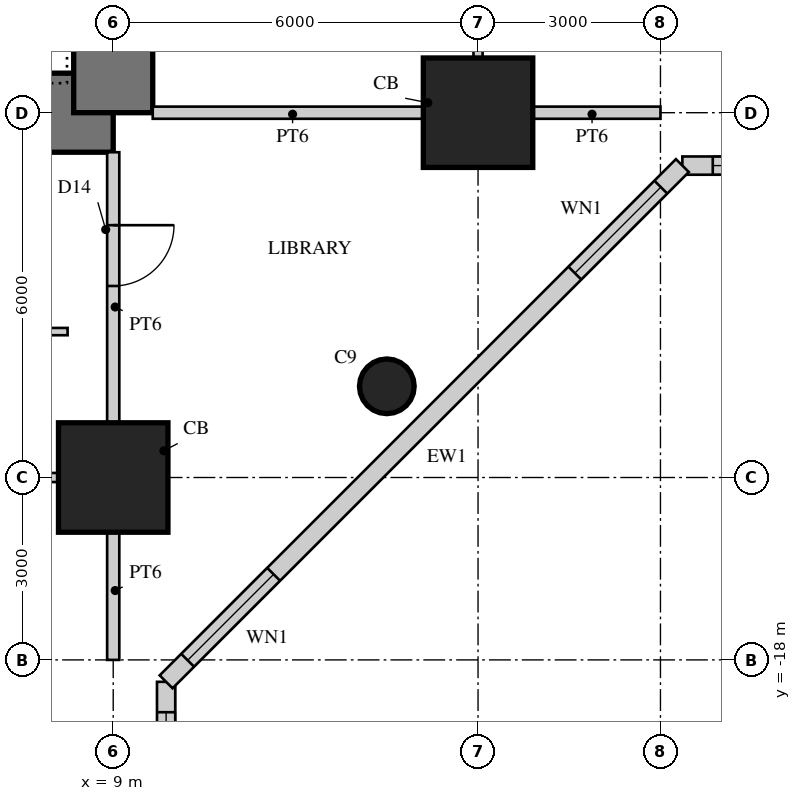
"""IFC4 building model, lengths in metres.
Left out: names, types, materials, properties, quantities, classifications, styles, units other than length and angle.
Written with IfcOpenShell. Run it as: python <this file> out.ifc"""

import sys

from ifc_helpers import new_model, si_unit, direction, frame, frame_2d, origin, origin_2d, place, context, subcontext, project, spatial, rectangle, hollow_rectangle, circle, extrude, element, fill, save


model = new_model("IFC4")
c1 = context("Model", 3, precision=1e-05, world=origin(), true_north=direction((0.0, 1.0)))
c2 = subcontext(c1, "Body", "Model", "MODEL_VIEW")
j1 = project(units=[si_unit("LENGTHUNIT", "METRE"), si_unit("PLANEANGLEUNIT", "RADIAN")], contexts=[c1])
p1 = place(None, origin())
s1 = spatial("IfcSite", under=j1, at=p1, CompositionType="ELEMENT")
p2 = place(p1, origin())
s2 = spatial("IfcBuilding", under=s1, at=p2, CompositionType="ELEMENT")
p3 = place(p2, frame((0.0, 0.0, 9.5)))
s3 = spatial("IfcBuildingStorey", under=s2, at=p3, CompositionType="ELEMENT", Elevation=9.5)
p4 = place(p3, frame((-9.0, -9.0, 0.0), z_axis=(0.0, 0.0, 1.0), x_axis=(1.0, 0.0, 0.0)))
e1 = element("IfcWall", 1, at=p4, inside=s3, PredefinedType="SHEAR", context=c2, shape_type="SweptSolid", body=[
    extrude(rectangle(XDim=18.0, YDim=1.3, at=frame_2d((9.0, 0.0))), origin(), (0.0, 0.0, 1.0), 4.5),
])
p5 = place(p4, frame((9.8, 0.0, 0.0)))
e2 = element("IfcOpeningElement", 2, at=p5, cuts=e1, PredefinedType="OPENING", context=c2, shape_type="SweptSolid", body=[
    extrude(rectangle(XDim=1.0, YDim=2.4, at=frame_2d((0.5, 1.2))), frame((0.0, 0.66, 0.0), z_axis=(0.0, -1.0, 0.0), x_axis=(1.0, 0.0, 0.0)), (0.0, 0.0, 1.0), 1.32),
])
p6 = place(p3, frame((9.0, -9.0, 0.0), z_axis=(0.0, 0.0, 1.0), x_axis=(0.0, 1.0, 0.0)))
e3 = element("IfcWall", 3, at=p6, inside=s3, PredefinedType="SHEAR", context=c2, shape_type="SweptSolid", body=[
    extrude(rectangle(XDim=18.0, YDim=1.3, at=frame_2d((9.0, 0.0))), origin(), (0.0, 0.0, 1.0), 4.5),
])
p7 = place(p6, frame((9.8, 0.0, 0.0)))
e4 = element("IfcOpeningElement", 4, at=p7, cuts=e3, PredefinedType="OPENING", context=c2, shape_type="SweptSolid", body=[
    extrude(rectangle(XDim=1.0, YDim=2.4, at=frame_2d((0.5, 1.2))), frame((0.0, 0.66, 0.0), z_axis=(0.0, -1.0, 0.0), x_axis=(1.0, 0.0, 0.0)), (0.0, 0.0, 1.0), 1.32),
])
for number, where, z_axis, x_axis in (
    (5, (15.0, -9.0, 0.0), (0.0, 0.0, 1.0), (1.0, 0.0, 0.0)),
    (6, (9.0, -15.0, 0.0), (0.0, 0.0, 1.0), (1.0, 0.0, 0.0)),
):
    element("IfcColumn", number, at=place(p3, frame(where, z_axis=z_axis, x_axis=x_axis)), inside=s3, PredefinedType="COLUMN", context=c2, shape_type="SweptSolid", body=[
        extrude(rectangle(XDim=1.8, YDim=1.8, at=origin_2d()), origin(), (0.0, 0.0, 1.0), 4.5),
    ])
p8 = place(p3, frame((13.5, -13.5, 0.0), z_axis=(0.0, 0.0, 1.0), x_axis=(1.0, 0.0, 0.0)))
e7 = element("IfcColumn", 7, at=p8, inside=s3, PredefinedType="COLUMN", context=c2, shape_type="SweptSolid", body=[
    extrude(circle(Radius=0.45, at=origin_2d()), origin(), (0.0, 0.0, 1.0), 4.5),
])
p9 = place(p3, frame((18.36, -9.87, 0.0), z_axis=(0.0, 0.0, 1.0), x_axis=(1.0, 0.0, 0.0)))
e8 = element("IfcWall", 8, at=p9, inside=s3, PredefinedType="SOLIDWALL", context=c2, shape_type="SweptSolid", body=[
    extrude(rectangle(XDim=6.0, YDim=0.3, at=frame_2d((3.0, 0.0))), origin(), (0.0, 0.0, 1.0), 4.3),
])
p10 = place(p9, frame((0.5, 0.0, 0.9)))
e9 = element("IfcOpeningElement", 9, at=p10, cuts=e8, PredefinedType="OPENING", context=c2, shape_type="SweptSolid", body=[
    extrude(rectangle(XDim=2.0, YDim=1.8, at=frame_2d((1.0, 0.9))), frame((0.0, 0.16, 0.0), z_axis=(0.0, -1.0, 0.0), x_axis=(1.0, 0.0, 0.0)), (0.0, 0.0, 1.0), 0.32),
])
p11 = place(p3, frame((9.87, -24.36, 0.0), z_axis=(0.0, 0.0, 1.0), x_axis=(0.0, 1.0, 0.0)))
e10 = element("IfcWall", 10, at=p11, inside=s3, PredefinedType="SOLIDWALL", context=c2, shape_type="SweptSolid", body=[
    extrude(rectangle(XDim=6.0, YDim=0.3, at=frame_2d((3.0, 0.0))), origin(), (0.0, 0.0, 1.0), 4.3),
])
p12 = place(p11, frame((3.5, 0.0, 0.9)))
e11 = element("IfcOpeningElement", 11, at=p12, cuts=e10, PredefinedType="OPENING", context=c2, shape_type="SweptSolid", body=[
    extrude(rectangle(XDim=2.0, YDim=1.8, at=frame_2d((1.0, 0.9))), frame((0.0, 0.16, 0.0), z_axis=(0.0, -1.0, 0.0), x_axis=(1.0, 0.0, 0.0)), (0.0, 0.0, 1.0), 0.32),
])
p13 = place(p3, frame((9.87, -18.36, 0.0), z_axis=(0.0, 0.0, 1.0), x_axis=(0.707106781187, 0.707106781187, 0.0)))
e12 = element("IfcWall", 12, at=p13, inside=s3, PredefinedType="SOLIDWALL", context=c2, shape_type="SweptSolid", body=[
    extrude(rectangle(XDim=12.007, YDim=0.3, at=frame_2d((6.003, 0.0))), origin(), (0.0, 0.0, 1.0), 4.3),
])
p14 = place(p13, frame((0.501, 0.0, 0.9)))
e13 = element("IfcOpeningElement", 13, at=p14, cuts=e12, PredefinedType="OPENING", context=c2, shape_type="SweptSolid", body=[
    extrude(rectangle(XDim=2.0, YDim=1.8, at=frame_2d((1.0, 0.9))), frame((0.0, 0.16, 0.0), z_axis=(0.0, -1.0, 0.0), x_axis=(1.0, 0.0, 0.0)), (0.0, 0.0, 1.0), 0.32),
])
p15 = place(p13, frame((9.506, 0.0, 0.9)))
e14 = element("IfcOpeningElement", 14, at=p15, cuts=e12, PredefinedType="OPENING", context=c2, shape_type="SweptSolid", body=[
    extrude(rectangle(XDim=2.0, YDim=1.8, at=frame_2d((1.0, 0.9))), frame((0.0, 0.16, 0.0), z_axis=(0.0, -1.0, 0.0), x_axis=(1.0, 0.0, 0.0)), (0.0, 0.0, 1.0), 0.32),
])
p16 = place(p3, frame((15.0, -8.25, 0.0), z_axis=(0.0, 0.0, 1.0), x_axis=(0.0, 1.0, 0.0)))
e15 = element("IfcWall", 15, at=p16, inside=s3, PredefinedType="PARTITIONING", context=c2, shape_type="SweptSolid", body=[
    extrude(rectangle(XDim=7.45, YDim=0.15, at=frame_2d((3.725, 0.0))), origin(), (0.0, 0.0, 1.0), 3.35),
])
p17 = place(p3, frame((2.575, -15.0, 0.0), z_axis=(0.0, 0.0, 1.0), x_axis=(1.0, 0.0, 0.0)))
e16 = element("IfcWall", 16, at=p17, inside=s3, PredefinedType="PARTITIONING", context=c2, shape_type="SweptSolid", body=[
    extrude(rectangle(XDim=5.675, YDim=0.15, at=frame_2d((2.837, 0.0))), origin(), (0.0, 0.0, 1.0), 3.35),
])
p18 = place(p3, frame((2.575, -12.6, 0.0), z_axis=(0.0, 0.0, 1.0), x_axis=(1.0, 0.0, 0.0)))
e17 = element("IfcWall", 17, at=p18, inside=s3, PredefinedType="PLUMBINGWALL", context=c2, shape_type="SweptSolid", body=[
    extrude(rectangle(XDim=5.675, YDim=0.12, at=frame_2d((2.837, 0.0))), origin(), (0.0, 0.0, 1.0), 4.3),
])
p19 = place(p3, frame((9.0, -9.65, 0.0), z_axis=(0.0, 0.0, 1.0), x_axis=(0.0, -1.0, 0.0)))
e18 = element("IfcWall", 18, at=p19, inside=s3, PredefinedType="SOLIDWALL", context=c2, shape_type="SweptSolid", body=[
    extrude(rectangle(XDim=4.6, YDim=0.2, at=frame_2d((2.3, 0.0))), origin(), (0.0, 0.0, 1.0), 3.3),
])
p20 = place(p19, frame((1.2, 0.0, 0.0)))
e19 = element("IfcOpeningElement", 19, at=p20, cuts=e18, PredefinedType="OPENING", context=c2, shape_type="SweptSolid", body=[
    extrude(rectangle(XDim=1.0, YDim=2.2, at=frame_2d((0.5, 1.1))), frame((0.0, 0.11, 0.0), z_axis=(0.0, -1.0, 0.0), x_axis=(1.0, 0.0, 0.0)), (0.0, 0.0, 1.0), 0.22),
])
p21 = place(p3, frame((9.0, -15.75, 0.0), z_axis=(0.0, 0.0, 1.0), x_axis=(0.0, -1.0, 0.0)))
e20 = element("IfcWall", 20, at=p21, inside=s3, PredefinedType="SOLIDWALL", context=c2, shape_type="SweptSolid", body=[
    extrude(rectangle(XDim=2.25, YDim=0.2, at=frame_2d((1.125, 0.0))), origin(), (0.0, 0.0, 1.0), 3.3),
])
p22 = place(p3, frame((14.25, -9.0, 0.0), z_axis=(0.0, 0.0, 1.0), x_axis=(-1.0, 0.0, 0.0)))
e21 = element("IfcWall", 21, at=p22, inside=s3, PredefinedType="SOLIDWALL", context=c2, shape_type="SweptSolid", body=[
    extrude(rectangle(XDim=4.6, YDim=0.2, at=frame_2d((2.3, 0.0))), origin(), (0.0, 0.0, 1.0), 3.3),
])
p23 = place(p3, frame((18.0, -9.0, 0.0), z_axis=(0.0, 0.0, 1.0), x_axis=(-1.0, 0.0, 0.0)))
e22 = element("IfcWall", 22, at=p23, inside=s3, PredefinedType="SOLIDWALL", context=c2, shape_type="SweptSolid", body=[
    extrude(rectangle(XDim=2.25, YDim=0.2, at=frame_2d((1.125, 0.0))), origin(), (0.0, 0.0, 1.0), 3.3),
])
p24 = place(p10, origin())
e23 = element("IfcWindow", 23, at=p24, inside=s3, PartitioningType="SINGLE_PANEL", PredefinedType="WINDOW", context=c2, shape_type="SweptSolid", body=[
    extrude(hollow_rectangle(XDim=2.0, YDim=1.8, WallThickness=0.06, at=frame_2d((1.0, 0.9))), frame((0.0, 0.03, 0.0), z_axis=(0.0, -1.0, 0.0), x_axis=(1.0, 0.0, 0.0)), (0.0, 0.0, 1.0), 0.06),
    extrude(rectangle(XDim=1.879, YDim=1.679, at=frame_2d((1.0, 0.9))), frame((0.0, 0.03, 0.0), z_axis=(0.0, -1.0, 0.0), x_axis=(1.0, 0.0, 0.0)), (0.0, 0.0, 1.0), 0.06),
])
fill(e9, e23)
p25 = place(p12, origin())
e24 = element("IfcWindow", 24, at=p25, inside=s3, PartitioningType="SINGLE_PANEL", PredefinedType="WINDOW", context=c2, shape_type="SweptSolid", body=[
    extrude(hollow_rectangle(XDim=2.0, YDim=1.8, WallThickness=0.06, at=frame_2d((1.0, 0.9))), frame((0.0, 0.03, 0.0), z_axis=(0.0, -1.0, 0.0), x_axis=(1.0, 0.0, 0.0)), (0.0, 0.0, 1.0), 0.06),
    extrude(rectangle(XDim=1.879, YDim=1.679, at=frame_2d((1.0, 0.9))), frame((0.0, 0.03, 0.0), z_axis=(0.0, -1.0, 0.0), x_axis=(1.0, 0.0, 0.0)), (0.0, 0.0, 1.0), 0.06),
])
fill(e11, e24)
p26 = place(p14, origin())
e25 = element("IfcWindow", 25, at=p26, inside=s3, PartitioningType="SINGLE_PANEL", PredefinedType="WINDOW", context=c2, shape_type="SweptSolid", body=[
    extrude(hollow_rectangle(XDim=2.0, YDim=1.8, WallThickness=0.06, at=frame_2d((1.0, 0.9))), frame((0.0, 0.03, 0.0), z_axis=(0.0, -1.0, 0.0), x_axis=(1.0, 0.0, 0.0)), (0.0, 0.0, 1.0), 0.06),
    extrude(rectangle(XDim=1.879, YDim=1.679, at=frame_2d((1.0, 0.9))), frame((0.0, 0.03, 0.0), z_axis=(0.0, -1.0, 0.0), x_axis=(1.0, 0.0, 0.0)), (0.0, 0.0, 1.0), 0.06),
])
fill(e13, e25)
p27 = place(p15, origin())
e26 = element("IfcWindow", 26, at=p27, inside=s3, PartitioningType="SINGLE_PANEL", PredefinedType="WINDOW", context=c2, shape_type="SweptSolid", body=[
    extrude(hollow_rectangle(XDim=2.0, YDim=1.8, WallThickness=0.06, at=frame_2d((1.0, 0.9))), frame((0.0, 0.03, 0.0), z_axis=(0.0, -1.0, 0.0), x_axis=(1.0, 0.0, 0.0)), (0.0, 0.0, 1.0), 0.06),
    extrude(rectangle(XDim=1.879, YDim=1.679, at=frame_2d((1.0, 0.9))), frame((0.0, 0.03, 0.0), z_axis=(0.0, -1.0, 0.0), x_axis=(1.0, 0.0, 0.0)), (0.0, 0.0, 1.0), 0.06),
])
fill(e14, e26)
p28 = place(p20, origin())
e27 = element("IfcDoor", 27, at=p28, inside=s3, OperationType="SINGLE_SWING_LEFT", PredefinedType="DOOR", context=c2, shape_type="SweptSolid", body=[
    extrude(rectangle(XDim=1.0, YDim=2.2, at=frame_2d((0.5, 1.1))), frame((0.0, 0.025, 0.0), z_axis=(0.0, -1.0, 0.0), x_axis=(1.0, 0.0, 0.0)), (0.0, 0.0, 1.0), 0.05),
])
fill(e19, e27)
save(model, sys.argv[1])
